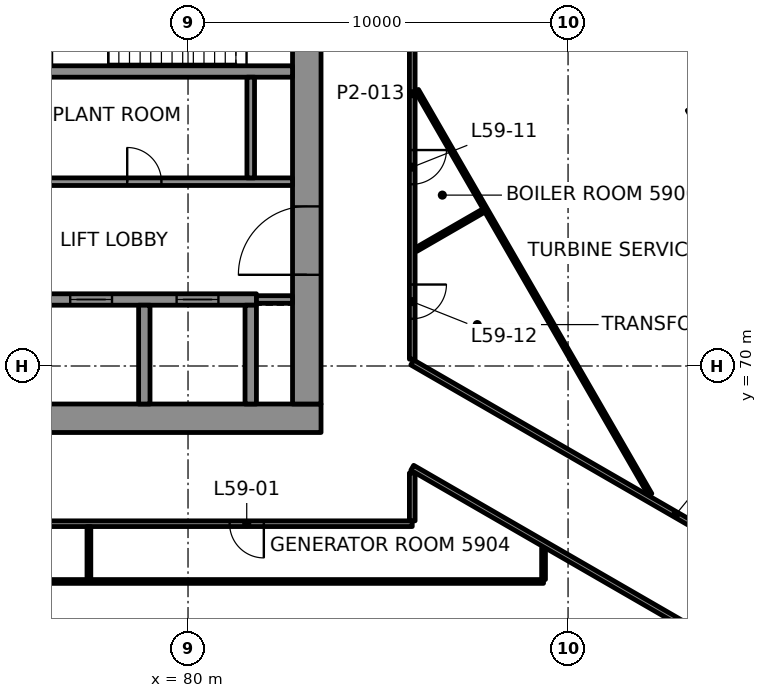
"""IFC4 building model, lengths in metres.
Left out: names, types, materials, properties, quantities, classifications, styles, units other than length and angle.
Written with IfcOpenShell. Run it as: python <this file> out.ifc"""

import sys

from ifc_helpers import new_model, si_unit, direction, frame, frame_2d, origin, origin_2d, place, context, subcontext, project, spatial, rectangle, hollow_rectangle, extrude, element, fill, save


model = new_model("IFC4")
c1 = context("Model", 3, precision=1e-05, world=origin(), true_north=direction((0.0, 1.0)))
c2 = subcontext(c1, "Body", "Model", "MODEL_VIEW")
j1 = project(units=[si_unit("LENGTHUNIT", "METRE"), si_unit("PLANEANGLEUNIT", "RADIAN")], contexts=[c1])
p1 = place(None, origin())
s1 = spatial("IfcSite", under=j1, at=p1, CompositionType="ELEMENT")
p2 = place(p1, origin())
s2 = spatial("IfcBuilding", under=s1, at=p2, CompositionType="ELEMENT")
p3 = place(p2, frame((0.0, 0.0, 252.1)))
s3 = spatial("IfcBuildingStorey", under=s2, at=p3, CompositionType="ELEMENT", Elevation=252.1)
p4 = place(p3, frame((93.771, 76.628, -0.0), z_axis=(0.0, 0.0, 1.0), x_axis=(-0.5, 0.866025403784, 0.0)))
e1 = element("IfcColumn", 1, at=p4, inside=s3, PredefinedType="COLUMN", context=c2, shape_type="SweptSolid", body=[
    extrude(hollow_rectangle(XDim=0.8, YDim=1.0, WallThickness=0.05, at=origin_2d()), origin(), (0.0, 0.0, 1.0), 4.5),
])
p5 = place(p3, frame((66.5, 68.625, 0.0), z_axis=(0.0, 0.0, 1.0), x_axis=(1.0, 0.0, 0.0)))
e2 = element("IfcWall", 2, at=p5, inside=s3, PredefinedType="SHEAR", context=c2, shape_type="SweptSolid", body=[
    extrude(rectangle(XDim=17.0, YDim=0.75, at=frame_2d((8.5, 0.0))), origin(), (0.0, 0.0, 1.0), 4.3),
])
p6 = place(p5, frame((1.9, 0.0, 0.0)))
e3 = element("IfcOpeningElement", 3, at=p6, cuts=e2, PredefinedType="OPENING", context=c2, shape_type="SweptSolid", body=[
    extrude(rectangle(XDim=0.9, YDim=2.1, at=frame_2d((0.45, 1.05))), frame((0.0, 0.385, 0.0), z_axis=(0.0, -1.0, 0.0), x_axis=(1.0, 0.0, 0.0)), (0.0, 0.0, 1.0), 0.77),
])
p7 = place(p3, frame((83.125, 69.0, 0.0), z_axis=(0.0, 0.0, 1.0), x_axis=(0.0, 1.0, 0.0)))
e4 = element("IfcWall", 4, at=p7, inside=s3, PredefinedType="SHEAR", context=c2, shape_type="SweptSolid", body=[
    extrude(rectangle(XDim=12.0, YDim=0.75, at=frame_2d((6.0, 0.0))), origin(), (0.0, 0.0, 1.0), 4.3),
])
p8 = place(p7, frame((3.4, 0.0, 0.0)))
e5 = element("IfcOpeningElement", 5, at=p8, cuts=e4, PredefinedType="OPENING", context=c2, shape_type="SweptSolid", body=[
    extrude(rectangle(XDim=1.8, YDim=2.1, at=frame_2d((0.9, 1.05))), frame((0.0, 0.385, 0.0), z_axis=(0.0, -1.0, 0.0), x_axis=(1.0, 0.0, 0.0)), (0.0, 0.0, 1.0), 0.77),
])
p9 = place(p3, frame((70.3, 71.75, 0.0), z_axis=(0.0, 0.0, 1.0), x_axis=(1.0, 0.0, 0.0)))
e6 = element("IfcWall", 6, at=p9, inside=s3, PredefinedType="SHEAR", context=c2, shape_type="SweptSolid", body=[
    extrude(rectangle(XDim=11.5, YDim=0.3, at=frame_2d((5.75, 0.0))), origin(), (0.0, 0.0, 1.0), 4.3),
])
p10 = place(p9, frame((1.0, 0.0, 0.0)))
e7 = element("IfcOpeningElement", 7, at=p10, cuts=e6, PredefinedType="OPENING", context=c2, shape_type="SweptSolid", body=[
    extrude(rectangle(XDim=1.1, YDim=2.1, at=frame_2d((0.55, 1.05))), frame((0.0, 0.16, 0.0), z_axis=(0.0, -1.0, 0.0), x_axis=(1.0, 0.0, 0.0)), (0.0, 0.0, 1.0), 0.32),
])
p11 = place(p9, frame((3.8, 0.0, 0.0)))
e8 = element("IfcOpeningElement", 8, at=p11, cuts=e6, PredefinedType="OPENING", context=c2, shape_type="SweptSolid", body=[
    extrude(rectangle(XDim=1.1, YDim=2.1, at=frame_2d((0.55, 1.05))), frame((0.0, 0.16, 0.0), z_axis=(0.0, -1.0, 0.0), x_axis=(1.0, 0.0, 0.0)), (0.0, 0.0, 1.0), 0.32),
])
p12 = place(p9, frame((6.6, 0.0, 0.0)))
e9 = element("IfcOpeningElement", 9, at=p12, cuts=e6, PredefinedType="OPENING", context=c2, shape_type="SweptSolid", body=[
    extrude(rectangle(XDim=1.1, YDim=2.1, at=frame_2d((0.55, 1.05))), frame((0.0, 0.16, 0.0), z_axis=(0.0, -1.0, 0.0), x_axis=(1.0, 0.0, 0.0)), (0.0, 0.0, 1.0), 0.32),
])
p13 = place(p9, frame((9.4, 0.0, 0.0)))
e10 = element("IfcOpeningElement", 10, at=p13, cuts=e6, PredefinedType="OPENING", context=c2, shape_type="SweptSolid", body=[
    extrude(rectangle(XDim=1.1, YDim=2.1, at=frame_2d((0.55, 1.05))), frame((0.0, 0.16, 0.0), z_axis=(0.0, -1.0, 0.0), x_axis=(1.0, 0.0, 0.0)), (0.0, 0.0, 1.0), 0.32),
])
for number, where, z_axis, x_axis in (
    (11, (78.85, 69.0, 0.0), (0.0, 0.0, 1.0), (0.0, 1.0, 0.0)),
    (12, (81.65, 69.0, 0.0), (0.0, 0.0, 1.0), (0.0, 1.0, 0.0)),
):
    element("IfcWall", number, at=place(p3, frame(where, z_axis=z_axis, x_axis=x_axis)), inside=s3, PredefinedType="SHEAR", context=c2, shape_type="SweptSolid", body=[
        extrude(rectangle(XDim=2.6, YDim=0.3, at=frame_2d((1.3, 0.0))), origin(), (0.0, 0.0, 1.0), 4.3),
    ])
p14 = place(p3, frame((67.25, 77.75, 0.0), z_axis=(0.0, 0.0, 1.0), x_axis=(1.0, 0.0, 0.0)))
e13 = element("IfcWall", 13, at=p14, inside=s3, PredefinedType="SHEAR", context=c2, shape_type="SweptSolid", body=[
    extrude(rectangle(XDim=15.5, YDim=0.3, at=frame_2d((7.75, 0.0))), origin(), (0.0, 0.0, 1.0), 4.3),
])
p15 = place(p14, frame((0.445, 0.0, 0.0)))
e14 = element("IfcOpeningElement", 14, at=p15, cuts=e13, PredefinedType="OPENING", context=c2, shape_type="SweptSolid", body=[
    extrude(rectangle(XDim=1.0, YDim=2.1, at=frame_2d((0.5, 1.05))), frame((0.0, 0.16, 0.0), z_axis=(0.0, -1.0, 0.0), x_axis=(1.0, 0.0, 0.0)), (0.0, 0.0, 1.0), 0.32),
])
p16 = place(p3, frame((58.921, 64.33, 0.0), z_axis=(0.0, 0.0, 1.0), x_axis=(1.0, 0.0, 0.0)))
e15 = element("IfcWall", 15, at=p16, inside=s3, PredefinedType="PARTITIONING", context=c2, shape_type="SweptSolid", body=[
    extrude(rectangle(XDim=30.434, YDim=0.1, at=frame_2d((15.217, 0.0))), origin(), (0.0, 0.0, 1.0), 3.7),
])
p17 = place(p3, frame((85.9, 65.85, 0.0), z_axis=(0.0, 0.0, 1.0), x_axis=(-1.0, 0.0, 0.0)))
e16 = element("IfcWall", 16, at=p17, inside=s3, PredefinedType="PARTITIONING", context=c2, shape_type="SweptSolid", body=[
    extrude(rectangle(XDim=21.8, YDim=0.15, at=frame_2d((10.9, 0.0))), origin(), (0.0, 0.0, 1.0), 3.7),
])
p18 = place(p17, frame((3.905, 0.0, 0.0)))
e17 = element("IfcOpeningElement", 17, at=p18, cuts=e16, PredefinedType="OPENING", context=c2, shape_type="SweptSolid", body=[
    extrude(rectangle(XDim=0.9, YDim=2.1, at=frame_2d((0.45, 1.05))), frame((0.0, 0.085, 0.0), z_axis=(0.0, -1.0, 0.0), x_axis=(1.0, 0.0, 0.0)), (0.0, 0.0, 1.0), 0.17),
])
p19 = place(p17, frame((12.843, 0.0, 0.0)))
e18 = element("IfcOpeningElement", 18, at=p19, cuts=e16, PredefinedType="OPENING", context=c2, shape_type="SweptSolid", body=[
    extrude(rectangle(XDim=0.9, YDim=2.1, at=frame_2d((0.45, 1.05))), frame((0.0, 0.085, 0.0), z_axis=(0.0, -1.0, 0.0), x_axis=(1.0, 0.0, 0.0)), (0.0, 0.0, 1.0), 0.17),
])
p20 = place(p17, frame((19.387, 0.0, 0.0)))
e19 = element("IfcOpeningElement", 19, at=p20, cuts=e16, PredefinedType="OPENING", context=c2, shape_type="SweptSolid", body=[
    extrude(rectangle(XDim=0.9, YDim=2.1, at=frame_2d((0.45, 1.05))), frame((0.0, 0.085, 0.0), z_axis=(0.0, -1.0, 0.0), x_axis=(1.0, 0.0, 0.0)), (0.0, 0.0, 1.0), 0.17),
])
p21 = place(p3, frame((86.001, 73.063, 0.0), z_axis=(0.0, 0.0, 1.0), x_axis=(0.866025804792, 0.499999305434, 0.0)))
e20 = element("IfcWall", 20, at=p21, inside=s3, PredefinedType="PARTITIONING", context=c2, shape_type="SweptSolid", body=[
    extrude(rectangle(XDim=2.061, YDim=0.1, at=frame_2d((1.031, 0.0))), origin(), (0.0, 0.0, 1.0), 3.7),
])
p22 = place(p3, frame((89.355, 64.38, 0.0), z_axis=(0.0, 0.0, 1.0), x_axis=(0.0, 1.0, 0.0)))
e21 = element("IfcWall", 21, at=p22, inside=s3, PredefinedType="PARTITIONING", context=c2, shape_type="SweptSolid", body=[
    extrude(rectangle(XDim=0.829, YDim=0.1, at=frame_2d((0.414, 0.0))), origin(), (0.0, 0.0, 1.0), 3.7),
])
p23 = place(p3, frame((85.9, 65.925, 0.0), z_axis=(0.0, 0.0, 1.0), x_axis=(0.0, 1.0, 0.0)))
e22 = element("IfcWall", 22, at=p23, inside=s3, PredefinedType="PARTITIONING", context=c2, shape_type="SweptSolid", body=[
    extrude(rectangle(XDim=1.26, YDim=0.15, at=frame_2d((0.63, 0.0))), origin(), (0.0, 0.0, 1.0), 3.7),
])
p24 = place(p3, frame((85.9, 84.15, 0.0), z_axis=(0.0, 0.0, 1.0), x_axis=(0.0, -1.0, 0.0)))
e23 = element("IfcWall", 23, at=p24, inside=s3, PredefinedType="PARTITIONING", context=c2, shape_type="SweptSolid", body=[
    extrude(rectangle(XDim=13.971, YDim=0.15, at=frame_2d((6.985, 0.0))), origin(), (0.0, 0.0, 1.0), 3.7),
])
p25 = place(p24, frame((8.467, 0.0, 0.0)))
e24 = element("IfcOpeningElement", 24, at=p25, cuts=e23, PredefinedType="OPENING", context=c2, shape_type="SweptSolid", body=[
    extrude(rectangle(XDim=0.9, YDim=2.1, at=frame_2d((0.45, 1.05))), frame((0.0, 0.085, 0.0), z_axis=(0.0, -1.0, 0.0), x_axis=(1.0, 0.0, 0.0)), (0.0, 0.0, 1.0), 0.17),
])
p26 = place(p24, frame((12.006, 0.0, 0.0)))
e25 = element("IfcOpeningElement", 25, at=p26, cuts=e23, PredefinedType="OPENING", context=c2, shape_type="SweptSolid", body=[
    extrude(rectangle(XDim=0.9, YDim=2.1, at=frame_2d((0.45, 1.05))), frame((0.0, 0.085, 0.0), z_axis=(0.0, -1.0, 0.0), x_axis=(1.0, 0.0, 0.0)), (0.0, 0.0, 1.0), 0.17),
])
p27 = place(p3, frame((77.392, 64.39, 0.0), z_axis=(0.0, 0.0, 1.0), x_axis=(0.0, 1.0, 0.0)))
e26 = element("IfcWall", 26, at=p27, inside=s3, PredefinedType="PARTITIONING", context=c2, shape_type="SweptSolid", body=[
    extrude(rectangle(XDim=1.385, YDim=0.1, at=frame_2d((0.692, 0.0))), origin(), (0.0, 0.0, 1.0), 3.7),
])
p28 = place(p3, frame((92.161, 66.616, 0.0), z_axis=(0.0, 0.0, 1.0), x_axis=(-0.50000005176, 0.866025373901, 0.0)))
e27 = element("IfcWall", 27, at=p28, inside=s3, PredefinedType="PARTITIONING", context=c2, shape_type="SweptSolid", body=[
    extrude(rectangle(XDim=12.282, YDim=0.1, at=frame_2d((6.141, 0.0))), origin(), (0.0, 0.0, 1.0), 3.7),
])
p29 = place(p3, frame((99.766, 62.087, 0.0), z_axis=(0.0, 0.0, 1.0), x_axis=(-0.866022819081, 0.500004476811, 0.0)))
e28 = element("IfcWall", 28, at=p29, inside=s3, PredefinedType="PARTITIONING", context=c2, shape_type="SweptSolid", body=[
    extrude(rectangle(XDim=16.011, YDim=0.15, at=frame_2d((8.005, 0.0))), origin(), (0.0, 0.0, 1.0), 3.7),
])
p30 = place(p3, frame((97.527, 60.609, 0.0), z_axis=(0.0, 0.0, 1.0), x_axis=(-0.866029927832, 0.499992164038, 0.0)))
e29 = element("IfcWall", 29, at=p30, inside=s3, PredefinedType="PARTITIONING", context=c2, shape_type="SweptSolid", body=[
    extrude(rectangle(XDim=13.425, YDim=0.15, at=frame_2d((6.712, 0.0))), origin(), (0.0, 0.0, 1.0), 3.7),
])
p31 = place(p3, frame((81.8, 71.75, 0.0), z_axis=(0.0, 0.0, 1.0), x_axis=(1.0, 0.0, 0.0)))
e30 = element("IfcWall", 30, at=p31, inside=s3, PredefinedType="PARTITIONING", context=c2, shape_type="SweptSolid", body=[
    extrude(rectangle(XDim=0.95, YDim=0.2, at=frame_2d((0.475, 0.0))), origin(), (0.0, 0.0, 1.0), 4.3),
])
p32 = place(p3, frame((76.2, 74.85, 0.0), z_axis=(0.0, 0.0, 1.0), x_axis=(1.0, 0.0, 0.0)))
e31 = element("IfcWall", 31, at=p32, inside=s3, PredefinedType="PARTITIONING", context=c2, shape_type="SweptSolid", body=[
    extrude(rectangle(XDim=6.55, YDim=0.2, at=frame_2d((3.275, 0.0))), origin(), (0.0, 0.0, 1.0), 4.3),
])
p33 = place(p32, frame((2.2, 0.0, 0.0)))
e32 = element("IfcOpeningElement", 32, at=p33, cuts=e31, PredefinedType="OPENING", context=c2, shape_type="SweptSolid", body=[
    extrude(rectangle(XDim=0.9, YDim=2.1, at=frame_2d((0.45, 1.05))), frame((0.0, 0.11, 0.0), z_axis=(0.0, -1.0, 0.0), x_axis=(1.0, 0.0, 0.0)), (0.0, 0.0, 1.0), 0.22),
])
p34 = place(p3, frame((81.65, 74.95, 0.0), z_axis=(0.0, 0.0, 1.0), x_axis=(0.0, 1.0, 0.0)))
e33 = element("IfcWall", 33, at=p34, inside=s3, PredefinedType="PARTITIONING", context=c2, shape_type="SweptSolid", body=[
    extrude(rectangle(XDim=2.65, YDim=0.2, at=frame_2d((1.325, 0.0))), origin(), (0.0, 0.0, 1.0), 4.3),
])
p35 = place(p18, origin())
e34 = element("IfcDoor", 34, at=p35, inside=s3, OperationType="SINGLE_SWING_RIGHT", PredefinedType="DOOR", context=c2, shape_type="SweptSolid", body=[
    extrude(rectangle(XDim=0.9, YDim=2.1, at=frame_2d((0.45, 1.05))), frame((0.0, 0.025, 0.0), z_axis=(0.0, -1.0, 0.0), x_axis=(1.0, 0.0, 0.0)), (0.0, 0.0, 1.0), 0.05),
])
fill(e17, e34)
p36 = place(p25, origin())
e35 = element("IfcDoor", 35, at=p36, inside=s3, OperationType="SINGLE_SWING_RIGHT", PredefinedType="DOOR", context=c2, shape_type="SweptSolid", body=[
    extrude(rectangle(XDim=0.9, YDim=2.1, at=frame_2d((0.45, 1.05))), frame((0.0, 0.025, 0.0), z_axis=(0.0, -1.0, 0.0), x_axis=(1.0, 0.0, 0.0)), (0.0, 0.0, 1.0), 0.05),
])
fill(e24, e35)
p37 = place(p26, origin())
e36 = element("IfcDoor", 36, at=p37, inside=s3, OperationType="SINGLE_SWING_LEFT", PredefinedType="DOOR", context=c2, shape_type="SweptSolid", body=[
    extrude(rectangle(XDim=0.9, YDim=2.1, at=frame_2d((0.45, 1.05))), frame((0.0, 0.025, 0.0), z_axis=(0.0, -1.0, 0.0), x_axis=(1.0, 0.0, 0.0)), (0.0, 0.0, 1.0), 0.05),
])
fill(e25, e36)
p38 = place(p12, origin())
e37 = element("IfcDoor", 37, at=p38, inside=s3, OperationType="DOUBLE_DOOR_SLIDING", PredefinedType="DOOR", context=c2, shape_type="SweptSolid", body=[
    extrude(rectangle(XDim=1.1, YDim=2.1, at=frame_2d((0.55, 1.05))), frame((0.0, 0.025, 0.0), z_axis=(0.0, -1.0, 0.0), x_axis=(1.0, 0.0, 0.0)), (0.0, 0.0, 1.0), 0.05),
])
fill(e9, e37)
p39 = place(p13, origin())
e38 = element("IfcDoor", 38, at=p39, inside=s3, OperationType="DOUBLE_DOOR_SLIDING", PredefinedType="DOOR", context=c2, shape_type="SweptSolid", body=[
    extrude(rectangle(XDim=1.1, YDim=2.1, at=frame_2d((0.55, 1.05))), frame((0.0, 0.025, 0.0), z_axis=(0.0, -1.0, 0.0), x_axis=(1.0, 0.0, 0.0)), (0.0, 0.0, 1.0), 0.05),
])
fill(e10, e38)
p40 = place(p8, origin())
e39 = element("IfcDoor", 39, at=p40, inside=s3, OperationType="SINGLE_SWING_LEFT", PredefinedType="DOOR", context=c2, shape_type="SweptSolid", body=[
    extrude(rectangle(XDim=1.8, YDim=2.1, at=frame_2d((0.9, 1.05))), frame((0.0, 0.095, 0.0), z_axis=(0.0, -1.0, 0.0), x_axis=(1.0, 0.0, 0.0)), (0.0, 0.0, 1.0), 0.19),
])
fill(e5, e39)
p41 = place(p33, origin())
e40 = element("IfcDoor", 40, at=p41, inside=s3, OperationType="SINGLE_SWING_LEFT", PredefinedType="DOOR", context=c2, shape_type="SweptSolid", body=[
    extrude(rectangle(XDim=0.9, YDim=2.1, at=frame_2d((0.45, 1.05))), frame((0.0, 0.025, 0.0), z_axis=(0.0, -1.0, 0.0), x_axis=(1.0, 0.0, 0.0)), (0.0, 0.0, 1.0), 0.05),
])
fill(e32, e40)
save(model, sys.argv[1])
